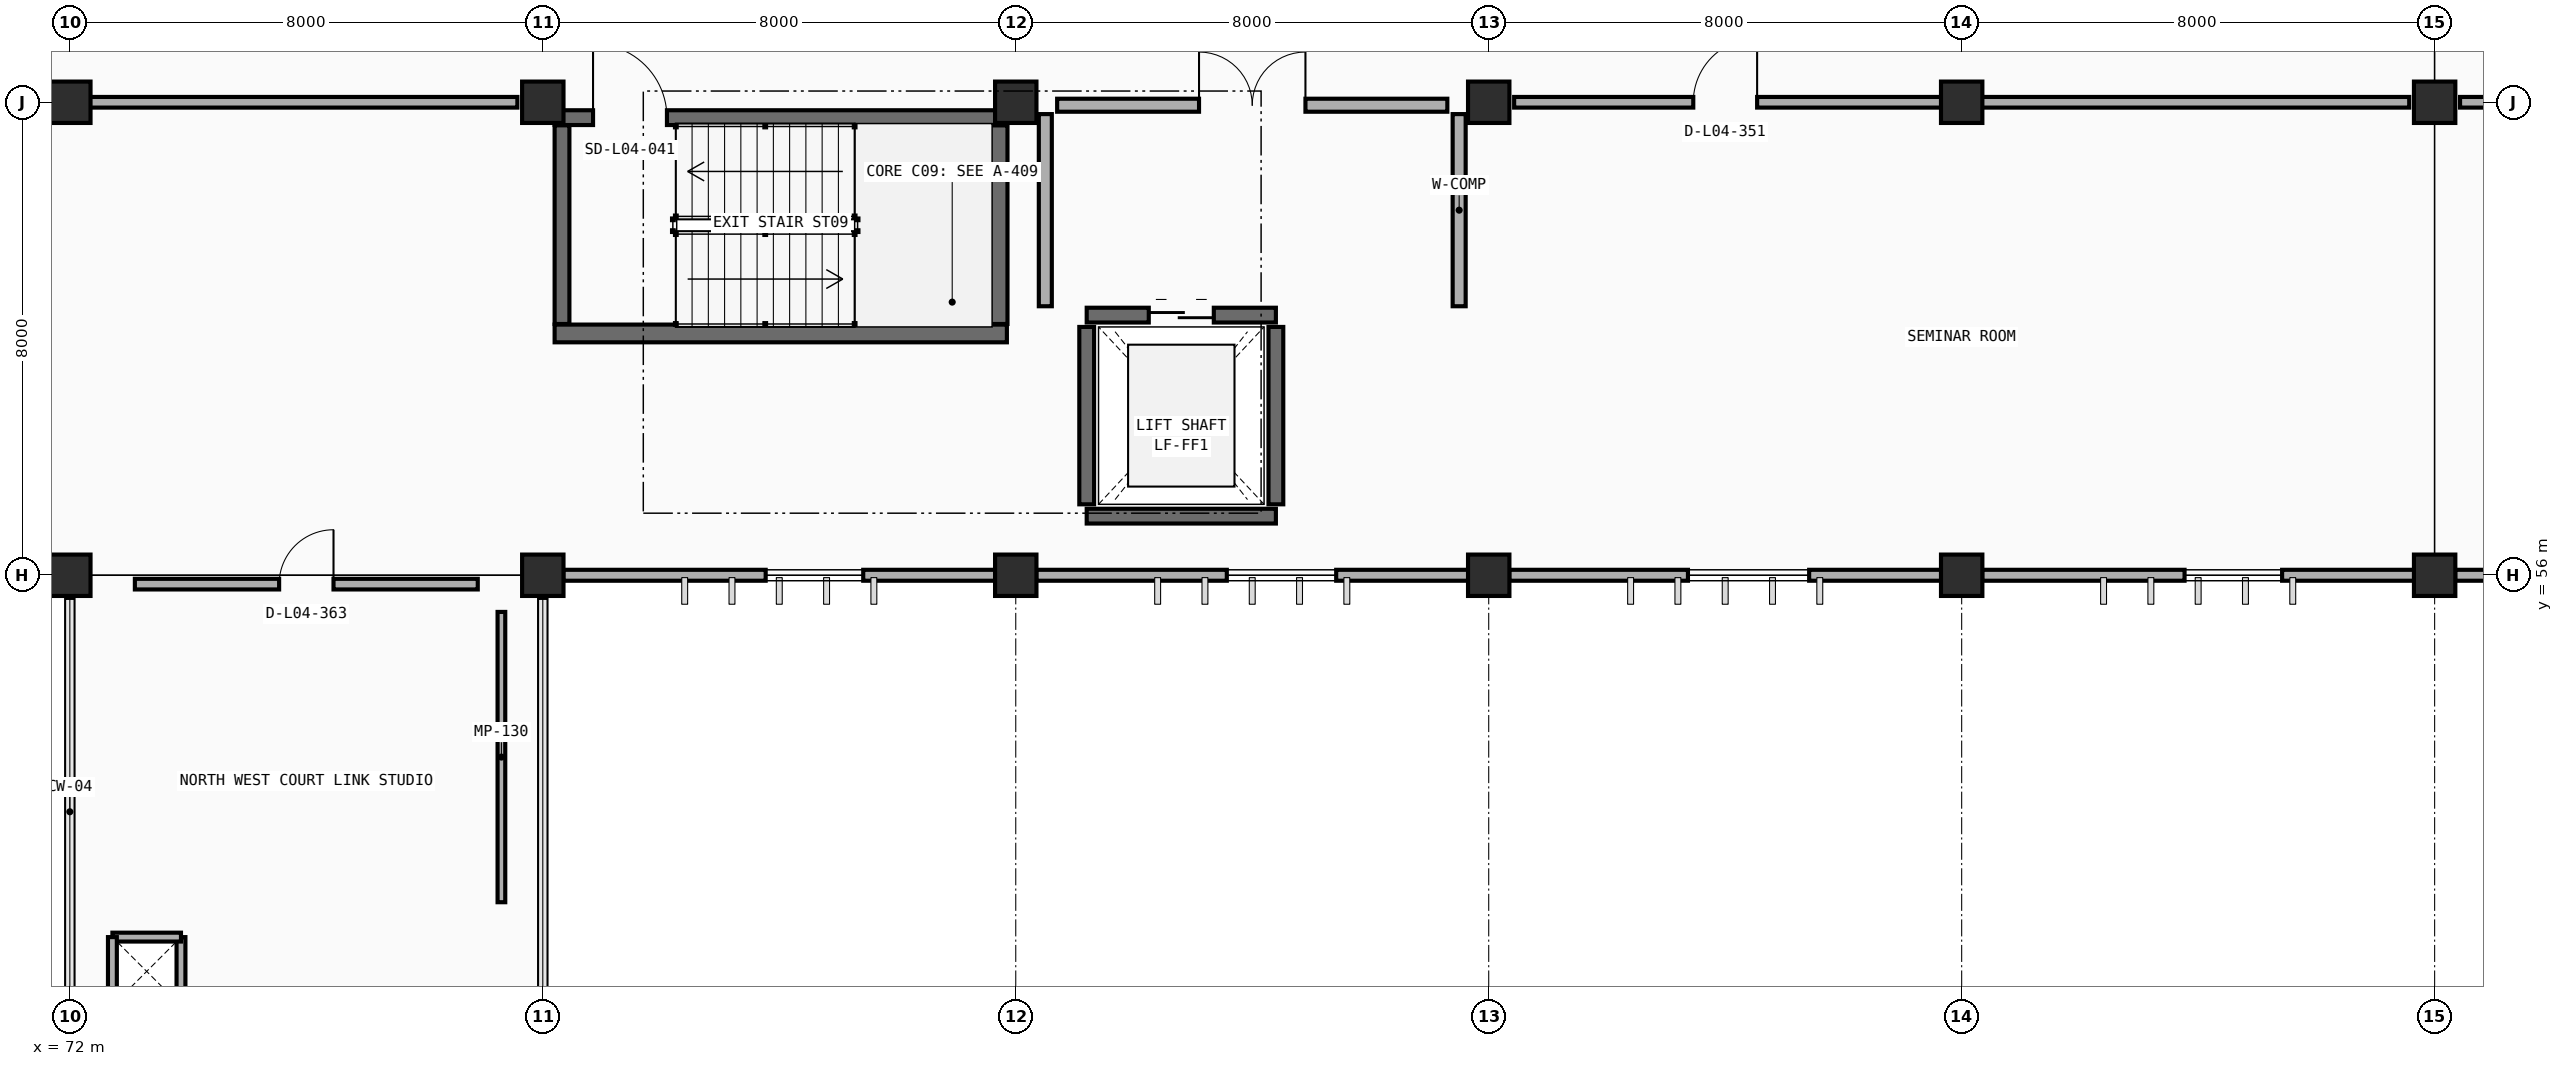
"""IFC4 building model, lengths in metres.
Left out: names, types, materials, properties, quantities, classifications, styles, units other than length and angle.
Written with IfcOpenShell. Run it as: python <this file> out.ifc"""

import sys

from ifc_helpers import new_model, si_unit, direction, frame, frame_2d, origin, origin_2d, place, context, subcontext, project, spatial, rectangle, extrude, element, fill, save


model = new_model("IFC4")
c1 = context("Model", 3, precision=1e-05, world=origin(), true_north=direction((0.0, 1.0)))
c2 = subcontext(c1, "Body", "Model", "MODEL_VIEW")
j1 = project(units=[si_unit("LENGTHUNIT", "METRE"), si_unit("PLANEANGLEUNIT", "RADIAN")], contexts=[c1])
p1 = place(None, origin())
s1 = spatial("IfcSite", under=j1, at=p1, CompositionType="ELEMENT")
p2 = place(p1, origin())
s2 = spatial("IfcBuilding", under=s1, at=p2, CompositionType="ELEMENT")
p3 = place(p2, frame((0.0, 0.0, 13.8)))
s3 = spatial("IfcBuildingStorey", under=s2, at=p3, CompositionType="ELEMENT", Elevation=13.8)
for number, where, z_axis, x_axis in (
    (1, (72.0, 56.0, 0.0), (0.0, 0.0, 1.0), (1.0, 0.0, 0.0)),
    (2, (80.0, 56.0, 0.0), (0.0, 0.0, 1.0), (1.0, 0.0, 0.0)),
    (3, (88.0, 56.0, 0.0), (0.0, 0.0, 1.0), (1.0, 0.0, 0.0)),
    (4, (96.0, 56.0, 0.0), (0.0, 0.0, 1.0), (1.0, 0.0, 0.0)),
    (5, (104.0, 56.0, 0.0), (0.0, 0.0, 1.0), (1.0, 0.0, 0.0)),
    (6, (112.0, 56.0, 0.0), (0.0, 0.0, 1.0), (1.0, 0.0, 0.0)),
    (7, (72.0, 64.0, 0.0), (0.0, 0.0, 1.0), (1.0, 0.0, 0.0)),
    (8, (80.0, 64.0, 0.0), (0.0, 0.0, 1.0), (1.0, 0.0, 0.0)),
    (9, (88.0, 64.0, 0.0), (0.0, 0.0, 1.0), (1.0, 0.0, 0.0)),
    (10, (96.0, 64.0, 0.0), (0.0, 0.0, 1.0), (1.0, 0.0, 0.0)),
    (11, (104.0, 64.0, 0.0), (0.0, 0.0, 1.0), (1.0, 0.0, 0.0)),
    (12, (112.0, 64.0, 0.0), (0.0, 0.0, 1.0), (1.0, 0.0, 0.0)),
):
    element("IfcColumn", number, at=place(p3, frame(where, z_axis=z_axis, x_axis=x_axis)), inside=s3, PredefinedType="COLUMN", context=c2, shape_type="SweptSolid", body=[
        extrude(rectangle(XDim=0.7, YDim=0.7, at=origin_2d()), origin(), (0.0, 0.0, 1.0), 4.2),
    ])
p4 = place(p3, frame((87.653, 56.0, 0.0), z_axis=(0.0, 0.0, 1.0), x_axis=(-1.0, 0.0, 0.0)))
e13 = element("IfcWall", 13, at=p4, inside=s3, PredefinedType="STANDARD", context=c2, shape_type="SweptSolid", body=[
    extrude(rectangle(XDim=7.306, YDim=0.185, at=frame_2d((3.653, 0.0))), origin(), (0.0, 0.0, 1.0), 3.325),
])
p5 = place(p4, frame((2.233, 0.0, 0.9)))
e14 = element("IfcOpeningElement", 14, at=p5, cuts=e13, PredefinedType="OPENING", context=c2, shape_type="SweptSolid", body=[
    extrude(rectangle(XDim=1.65, YDim=2.0, at=frame_2d((0.825, 1.0))), frame((0.0, 0.103, 0.0), z_axis=(0.0, -1.0, 0.0), x_axis=(1.0, 0.0, 0.0)), (0.0, 0.0, 1.0), 0.205),
])
p6 = place(p3, frame((95.653, 56.0, 0.0), z_axis=(0.0, 0.0, 1.0), x_axis=(-1.0, 0.0, 0.0)))
e15 = element("IfcWall", 15, at=p6, inside=s3, PredefinedType="STANDARD", context=c2, shape_type="SweptSolid", body=[
    extrude(rectangle(XDim=7.306, YDim=0.185, at=frame_2d((3.653, 0.0))), origin(), (0.0, 0.0, 1.0), 3.325),
])
p7 = place(p6, frame((2.233, 0.0, 0.9)))
e16 = element("IfcOpeningElement", 16, at=p7, cuts=e15, PredefinedType="OPENING", context=c2, shape_type="SweptSolid", body=[
    extrude(rectangle(XDim=1.85, YDim=2.0, at=frame_2d((0.925, 1.0))), frame((0.0, 0.103, 0.0), z_axis=(0.0, -1.0, 0.0), x_axis=(1.0, 0.0, 0.0)), (0.0, 0.0, 1.0), 0.205),
])
p8 = place(p3, frame((103.653, 56.0, 0.0), z_axis=(0.0, 0.0, 1.0), x_axis=(-1.0, 0.0, 0.0)))
e17 = element("IfcWall", 17, at=p8, inside=s3, PredefinedType="STANDARD", context=c2, shape_type="SweptSolid", body=[
    extrude(rectangle(XDim=7.306, YDim=0.185, at=frame_2d((3.653, 0.0))), origin(), (0.0, 0.0, 1.0), 3.325),
])
p9 = place(p8, frame((2.233, 0.0, 0.9)))
e18 = element("IfcOpeningElement", 18, at=p9, cuts=e17, PredefinedType="OPENING", context=c2, shape_type="SweptSolid", body=[
    extrude(rectangle(XDim=2.05, YDim=2.0, at=frame_2d((1.025, 1.0))), frame((0.0, 0.103, 0.0), z_axis=(0.0, -1.0, 0.0), x_axis=(1.0, 0.0, 0.0)), (0.0, 0.0, 1.0), 0.205),
])
p10 = place(p3, frame((111.653, 56.0, 0.0), z_axis=(0.0, 0.0, 1.0), x_axis=(-1.0, 0.0, 0.0)))
e19 = element("IfcWall", 19, at=p10, inside=s3, PredefinedType="STANDARD", context=c2, shape_type="SweptSolid", body=[
    extrude(rectangle(XDim=7.306, YDim=0.185, at=frame_2d((3.653, 0.0))), origin(), (0.0, 0.0, 1.0), 3.325),
])
p11 = place(p10, frame((2.233, 0.0, 0.9)))
e20 = element("IfcOpeningElement", 20, at=p11, cuts=e19, PredefinedType="OPENING", context=c2, shape_type="SweptSolid", body=[
    extrude(rectangle(XDim=1.65, YDim=2.0, at=frame_2d((0.825, 1.0))), frame((0.0, 0.103, 0.0), z_axis=(0.0, -1.0, 0.0), x_axis=(1.0, 0.0, 0.0)), (0.0, 0.0, 1.0), 0.205),
])
p12 = place(p3, frame((119.653, 56.0, 0.0), z_axis=(0.0, 0.0, 1.0), x_axis=(-1.0, 0.0, 0.0)))
e21 = element("IfcWall", 21, at=p12, inside=s3, PredefinedType="STANDARD", context=c2, shape_type="SweptSolid", body=[
    extrude(rectangle(XDim=7.306, YDim=0.185, at=frame_2d((3.653, 0.0))), origin(), (0.0, 0.0, 1.0), 3.325),
])
p13 = place(p12, frame((2.233, 0.0, 0.9)))
e22 = element("IfcOpeningElement", 22, at=p13, cuts=e21, PredefinedType="OPENING", context=c2, shape_type="SweptSolid", body=[
    extrude(rectangle(XDim=1.85, YDim=2.0, at=frame_2d((0.925, 1.0))), frame((0.0, 0.103, 0.0), z_axis=(0.0, -1.0, 0.0), x_axis=(1.0, 0.0, 0.0)), (0.0, 0.0, 1.0), 0.205),
])
p14 = place(p3, frame((80.2, 60.09, 0.0), z_axis=(0.0, 0.0, 1.0), x_axis=(1.0, 0.0, 0.0)))
e23 = element("IfcWall", 23, at=p14, inside=s3, PredefinedType="SHEAR", context=c2, shape_type="SweptSolid", body=[
    extrude(rectangle(XDim=7.65, YDim=0.3, at=frame_2d((3.825, 0.0))), origin(), (0.0, 0.0, 1.0), 4.2),
])
p15 = place(p3, frame((87.71, 60.25, 0.0), z_axis=(0.0, 0.0, 1.0), x_axis=(0.0, 1.0, 0.0)))
e24 = element("IfcWall", 24, at=p15, inside=s3, PredefinedType="SHEAR", context=c2, shape_type="SweptSolid", body=[
    extrude(rectangle(XDim=3.36, YDim=0.3, at=frame_2d((1.68, 0.0))), origin(), (0.0, 0.0, 1.0), 4.2),
])
p16 = place(p3, frame((80.2, 63.74, 0.0), z_axis=(0.0, 0.0, 1.0), x_axis=(1.0, 0.0, 0.0)))
e25 = element("IfcWall", 25, at=p16, inside=s3, PredefinedType="SOLIDWALL", context=c2, shape_type="SweptSolid", body=[
    extrude(rectangle(XDim=7.65, YDim=0.25, at=frame_2d((3.825, 0.0))), origin(), (0.0, 0.0, 1.0), 4.2),
])
p17 = place(p16, frame((0.65, 0.0, 0.0)))
e26 = element("IfcOpeningElement", 26, at=p17, cuts=e25, PredefinedType="OPENING", context=c2, shape_type="SweptSolid", body=[
    extrude(rectangle(XDim=1.25, YDim=2.15, at=frame_2d((0.625, 1.075))), frame((0.0, 0.135, 0.0), z_axis=(0.0, -1.0, 0.0), x_axis=(1.0, 0.0, 0.0)), (0.0, 0.0, 1.0), 0.27),
])
p18 = place(p3, frame((80.325, 60.25, 0.0), z_axis=(0.0, 0.0, 1.0), x_axis=(0.0, 1.0, 0.0)))
e27 = element("IfcWall", 27, at=p18, inside=s3, PredefinedType="SOLIDWALL", context=c2, shape_type="SweptSolid", body=[
    extrude(rectangle(XDim=3.36, YDim=0.25, at=frame_2d((1.68, 0.0))), origin(), (0.0, 0.0, 1.0), 4.2),
])
p19 = place(p3, frame((89.2, 57.0, 0.0), z_axis=(0.0, 0.0, 1.0), x_axis=(1.0, 0.0, 0.0)))
e28 = element("IfcWall", 28, at=p19, inside=s3, PredefinedType="SOLIDWALL", context=c2, shape_type="SweptSolid", body=[
    extrude(rectangle(XDim=3.2, YDim=0.25, at=frame_2d((1.6, 0.0))), origin(), (0.0, 0.0, 1.0), 4.2),
])
p20 = place(p3, frame((89.2, 60.4, 0.0), z_axis=(0.0, 0.0, 1.0), x_axis=(1.0, 0.0, 0.0)))
e29 = element("IfcWall", 29, at=p20, inside=s3, PredefinedType="SOLIDWALL", context=c2, shape_type="SweptSolid", body=[
    extrude(rectangle(XDim=3.2, YDim=0.25, at=frame_2d((1.6, 0.0))), origin(), (0.0, 0.0, 1.0), 4.2),
])
p21 = place(p20, frame((1.05, 0.0, 0.0)))
e30 = element("IfcOpeningElement", 30, at=p21, cuts=e29, PredefinedType="OPENING", context=c2, shape_type="SweptSolid", body=[
    extrude(rectangle(XDim=1.1, YDim=2.15, at=frame_2d((0.55, 1.075))), frame((0.0, 0.135, 0.0), z_axis=(0.0, -1.0, 0.0), x_axis=(1.0, 0.0, 0.0)), (0.0, 0.0, 1.0), 0.27),
])
for number, where, z_axis, x_axis in (
    (31, (89.2, 57.2, 0.0), (0.0, 0.0, 1.0), (0.0, 1.0, 0.0)),
    (32, (92.4, 57.2, 0.0), (0.0, 0.0, 1.0), (0.0, 1.0, 0.0)),
):
    element("IfcWall", number, at=place(p3, frame(where, z_axis=z_axis, x_axis=x_axis)), inside=s3, PredefinedType="SOLIDWALL", context=c2, shape_type="SweptSolid", body=[
        extrude(rectangle(XDim=3.0, YDim=0.25, at=frame_2d((1.5, 0.0))), origin(), (0.0, 0.0, 1.0), 4.2),
    ])
p22 = place(p3, frame((88.7, 63.95, 0.0), z_axis=(0.0, 0.0, 1.0), x_axis=(1.0, 0.0, 0.0)))
e33 = element("IfcWall", 33, at=p22, inside=s3, PredefinedType="PARTITIONING", context=c2, shape_type="SweptSolid", body=[
    extrude(rectangle(XDim=6.6, YDim=0.22, at=frame_2d((3.3, 0.0))), origin(), (0.0, 0.0, 1.0), 3.275),
])
p23 = place(p22, frame((2.4, 0.0, 0.0)))
e34 = element("IfcOpeningElement", 34, at=p23, cuts=e33, PredefinedType="OPENING", context=c2, shape_type="SweptSolid", body=[
    extrude(rectangle(XDim=1.8, YDim=2.2, at=frame_2d((0.9, 1.1))), frame((0.0, 0.12, 0.0), z_axis=(0.0, -1.0, 0.0), x_axis=(1.0, 0.0, 0.0)), (0.0, 0.0, 1.0), 0.24),
])
for number, where, z_axis, x_axis in (
    (35, (88.5, 60.55, 0.0), (0.0, 0.0, 1.0), (0.0, 1.0, 0.0)),
    (36, (95.5, 60.55, 0.0), (0.0, 0.0, 1.0), (0.0, 1.0, 0.0)),
):
    element("IfcWall", number, at=place(p3, frame(where, z_axis=z_axis, x_axis=x_axis)), inside=s3, PredefinedType="PARTITIONING", context=c2, shape_type="SweptSolid", body=[
        extrude(rectangle(XDim=3.25, YDim=0.22, at=frame_2d((1.625, 0.0))), origin(), (0.0, 0.0, 1.0), 3.225),
    ])
for number, where, z_axis, x_axis in (
    (37, (73.88, 48.72, 0.0), (0.0, 0.0, 1.0), (0.0, 1.0, 0.0)),
    (38, (73.88, 49.88, 0.0), (0.0, 0.0, 1.0), (-1.0, 0.0, 0.0)),
    (39, (72.72, 49.88, 0.0), (0.0, 0.0, 1.0), (0.0, -1.0, 0.0)),
):
    element("IfcWall", number, at=place(p3, frame(where, z_axis=z_axis, x_axis=x_axis)), inside=s3, PredefinedType="PARTITIONING", context=c2, shape_type="SweptSolid", body=[
        extrude(rectangle(XDim=1.16, YDim=0.15, at=frame_2d((0.58, 0.0))), origin(), (0.0, 0.0, 1.0), 3.9),
    ])
p24 = place(p3, frame((56.43, 64.0, 0.0), z_axis=(0.0, 0.0, 1.0), x_axis=(1.0, 0.0, 0.0)))
e40 = element("IfcWall", 40, at=p24, inside=s3, PredefinedType="PARTITIONING", context=c2, shape_type="SweptSolid", body=[
    extrude(rectangle(XDim=23.14, YDim=0.18, at=frame_2d((11.57, 0.0))), origin(), (0.0, 0.0, 1.0), 3.275),
])
p25 = place(p24, frame((2.85, 0.0, 0.0)))
e41 = element("IfcOpeningElement", 41, at=p25, cuts=e40, PredefinedType="OPENING", context=c2, shape_type="SweptSolid", body=[
    extrude(rectangle(XDim=1.44, YDim=2.2, at=frame_2d((0.72, 1.1))), frame((0.0, 0.1, 0.0), z_axis=(0.0, -1.0, 0.0), x_axis=(1.0, 0.0, 0.0)), (0.0, 0.0, 1.0), 0.2),
])
p26 = place(p3, frame((96.43, 64.0, 0.0), z_axis=(0.0, 0.0, 1.0), x_axis=(1.0, 0.0, 0.0)))
e42 = element("IfcWall", 42, at=p26, inside=s3, PredefinedType="PARTITIONING", context=c2, shape_type="SweptSolid", body=[
    extrude(rectangle(XDim=15.14, YDim=0.18, at=frame_2d((7.57, 0.0))), origin(), (0.0, 0.0, 1.0), 3.275),
])
p27 = place(p26, frame((3.03, 0.0, 0.0)))
e43 = element("IfcOpeningElement", 43, at=p27, cuts=e42, PredefinedType="OPENING", context=c2, shape_type="SweptSolid", body=[
    extrude(rectangle(XDim=1.08, YDim=2.15, at=frame_2d((0.54, 1.075))), frame((0.0, 0.1, 0.0), z_axis=(0.0, -1.0, 0.0), x_axis=(1.0, 0.0, 0.0)), (0.0, 0.0, 1.0), 0.2),
])
p28 = place(p3, frame((112.43, 64.0, 0.0), z_axis=(0.0, 0.0, 1.0), x_axis=(1.0, 0.0, 0.0)))
e44 = element("IfcWall", 44, at=p28, inside=s3, PredefinedType="PARTITIONING", context=c2, shape_type="SweptSolid", body=[
    extrude(rectangle(XDim=7.14, YDim=0.18, at=frame_2d((3.57, 0.0))), origin(), (0.0, 0.0, 1.0), 3.275),
])
p29 = place(p28, frame((3.0, 0.0, 0.0)))
e45 = element("IfcOpeningElement", 45, at=p29, cuts=e44, PredefinedType="OPENING", context=c2, shape_type="SweptSolid", body=[
    extrude(rectangle(XDim=1.14, YDim=2.15, at=frame_2d((0.57, 1.075))), frame((0.0, 0.1, 0.0), z_axis=(0.0, -1.0, 0.0), x_axis=(1.0, 0.0, 0.0)), (0.0, 0.0, 1.0), 0.2),
])
p30 = place(p3, frame((73.1, 55.85, 0.0), z_axis=(0.0, 0.0, 1.0), x_axis=(1.0, 0.0, 0.0)))
e46 = element("IfcWall", 46, at=p30, inside=s3, PredefinedType="PARTITIONING", context=c2, shape_type="SweptSolid", body=[
    extrude(rectangle(XDim=5.8, YDim=0.18, at=frame_2d((2.9, 0.0))), origin(), (0.0, 0.0, 1.0), 3.3),
])
p31 = place(p30, frame((2.44, 0.0, 0.0)))
e47 = element("IfcOpeningElement", 47, at=p31, cuts=e46, PredefinedType="OPENING", context=c2, shape_type="SweptSolid", body=[
    extrude(rectangle(XDim=0.92, YDim=2.15, at=frame_2d((0.46, 1.075))), frame((0.0, 0.1, 0.0), z_axis=(0.0, -1.0, 0.0), x_axis=(1.0, 0.0, 0.0)), (0.0, 0.0, 1.0), 0.2),
])
p32 = place(p3, frame((79.3, 50.47, 0.0), z_axis=(0.0, 0.0, 1.0), x_axis=(0.0, 1.0, 0.0)))
e48 = element("IfcWall", 48, at=p32, inside=s3, PredefinedType="MOVABLE", context=c2, shape_type="SweptSolid", body=[
    extrude(rectangle(XDim=4.91, YDim=0.13, at=frame_2d((2.455, 0.0))), origin(), (0.0, 0.0, 1.0), 3.3),
])
p33 = place(p5, origin())
e49 = element("IfcWindow", 49, at=p33, inside=s3, PartitioningType="DOUBLE_PANEL_VERTICAL", PredefinedType="WINDOW", context=c2, shape_type="SweptSolid", body=[
    extrude(rectangle(XDim=1.65, YDim=2.0, at=frame_2d((0.825, 1.0))), frame((0.0, 0.03, 0.0), z_axis=(0.0, -1.0, 0.0), x_axis=(1.0, 0.0, 0.0)), (0.0, 0.0, 1.0), 0.06),
])
fill(e14, e49)
p34 = place(p7, origin())
e50 = element("IfcWindow", 50, at=p34, inside=s3, PartitioningType="DOUBLE_PANEL_VERTICAL", PredefinedType="WINDOW", context=c2, shape_type="SweptSolid", body=[
    extrude(rectangle(XDim=1.85, YDim=2.0, at=frame_2d((0.925, 1.0))), frame((0.0, 0.03, 0.0), z_axis=(0.0, -1.0, 0.0), x_axis=(1.0, 0.0, 0.0)), (0.0, 0.0, 1.0), 0.06),
])
fill(e16, e50)
p35 = place(p9, origin())
e51 = element("IfcWindow", 51, at=p35, inside=s3, PartitioningType="DOUBLE_PANEL_VERTICAL", PredefinedType="WINDOW", context=c2, shape_type="SweptSolid", body=[
    extrude(rectangle(XDim=2.05, YDim=2.0, at=frame_2d((1.025, 1.0))), frame((0.0, 0.03, 0.0), z_axis=(0.0, -1.0, 0.0), x_axis=(1.0, 0.0, 0.0)), (0.0, 0.0, 1.0), 0.06),
])
fill(e18, e51)
p36 = place(p11, origin())
e52 = element("IfcWindow", 52, at=p36, inside=s3, PartitioningType="DOUBLE_PANEL_VERTICAL", PredefinedType="WINDOW", context=c2, shape_type="SweptSolid", body=[
    extrude(rectangle(XDim=1.65, YDim=2.0, at=frame_2d((0.825, 1.0))), frame((0.0, 0.03, 0.0), z_axis=(0.0, -1.0, 0.0), x_axis=(1.0, 0.0, 0.0)), (0.0, 0.0, 1.0), 0.06),
])
fill(e20, e52)
p37 = place(p17, origin())
e53 = element("IfcDoor", 53, at=p37, inside=s3, OperationType="SINGLE_SWING_LEFT", PredefinedType="DOOR", context=c2, shape_type="SweptSolid", body=[
    extrude(rectangle(XDim=1.25, YDim=2.15, at=frame_2d((0.625, 1.075))), frame((0.0, 0.025, 0.0), z_axis=(0.0, -1.0, 0.0), x_axis=(1.0, 0.0, 0.0)), (0.0, 0.0, 1.0), 0.05),
])
fill(e26, e53)
p38 = place(p21, origin())
e54 = element("IfcDoor", 54, at=p38, inside=s3, OperationType="DOUBLE_DOOR_SLIDING", PredefinedType="DOOR", context=c2, shape_type="SweptSolid", body=[
    extrude(rectangle(XDim=1.1, YDim=2.15, at=frame_2d((0.55, 1.075))), frame((0.0, 0.025, 0.0), z_axis=(0.0, -1.0, 0.0), x_axis=(1.0, 0.0, 0.0)), (0.0, 0.0, 1.0), 0.05),
])
fill(e30, e54)
p39 = place(p23, origin())
e55 = element("IfcDoor", 55, at=p39, inside=s3, OperationType="DOUBLE_DOOR_SINGLE_SWING", PredefinedType="DOOR", context=c2, shape_type="SweptSolid", body=[
    extrude(rectangle(XDim=1.8, YDim=2.2, at=frame_2d((0.9, 1.1))), frame((0.0, 0.025, 0.0), z_axis=(0.0, -1.0, 0.0), x_axis=(1.0, 0.0, 0.0)), (0.0, 0.0, 1.0), 0.05),
])
fill(e34, e55)
p40 = place(p27, origin())
e56 = element("IfcDoor", 56, at=p40, inside=s3, OperationType="SINGLE_SWING_RIGHT", PredefinedType="DOOR", context=c2, shape_type="SweptSolid", body=[
    extrude(rectangle(XDim=1.08, YDim=2.15, at=frame_2d((0.54, 1.075))), frame((0.0, 0.025, 0.0), z_axis=(0.0, -1.0, 0.0), x_axis=(1.0, 0.0, 0.0)), (0.0, 0.0, 1.0), 0.05),
])
fill(e43, e56)
p41 = place(p31, origin())
e57 = element("IfcDoor", 57, at=p41, inside=s3, OperationType="SINGLE_SWING_RIGHT", PredefinedType="DOOR", context=c2, shape_type="SweptSolid", body=[
    extrude(rectangle(XDim=0.92, YDim=2.15, at=frame_2d((0.46, 1.075))), frame((0.0, 0.025, 0.0), z_axis=(0.0, -1.0, 0.0), x_axis=(1.0, 0.0, 0.0)), (0.0, 0.0, 1.0), 0.05),
])
fill(e47, e57)
save(model, sys.argv[1])
